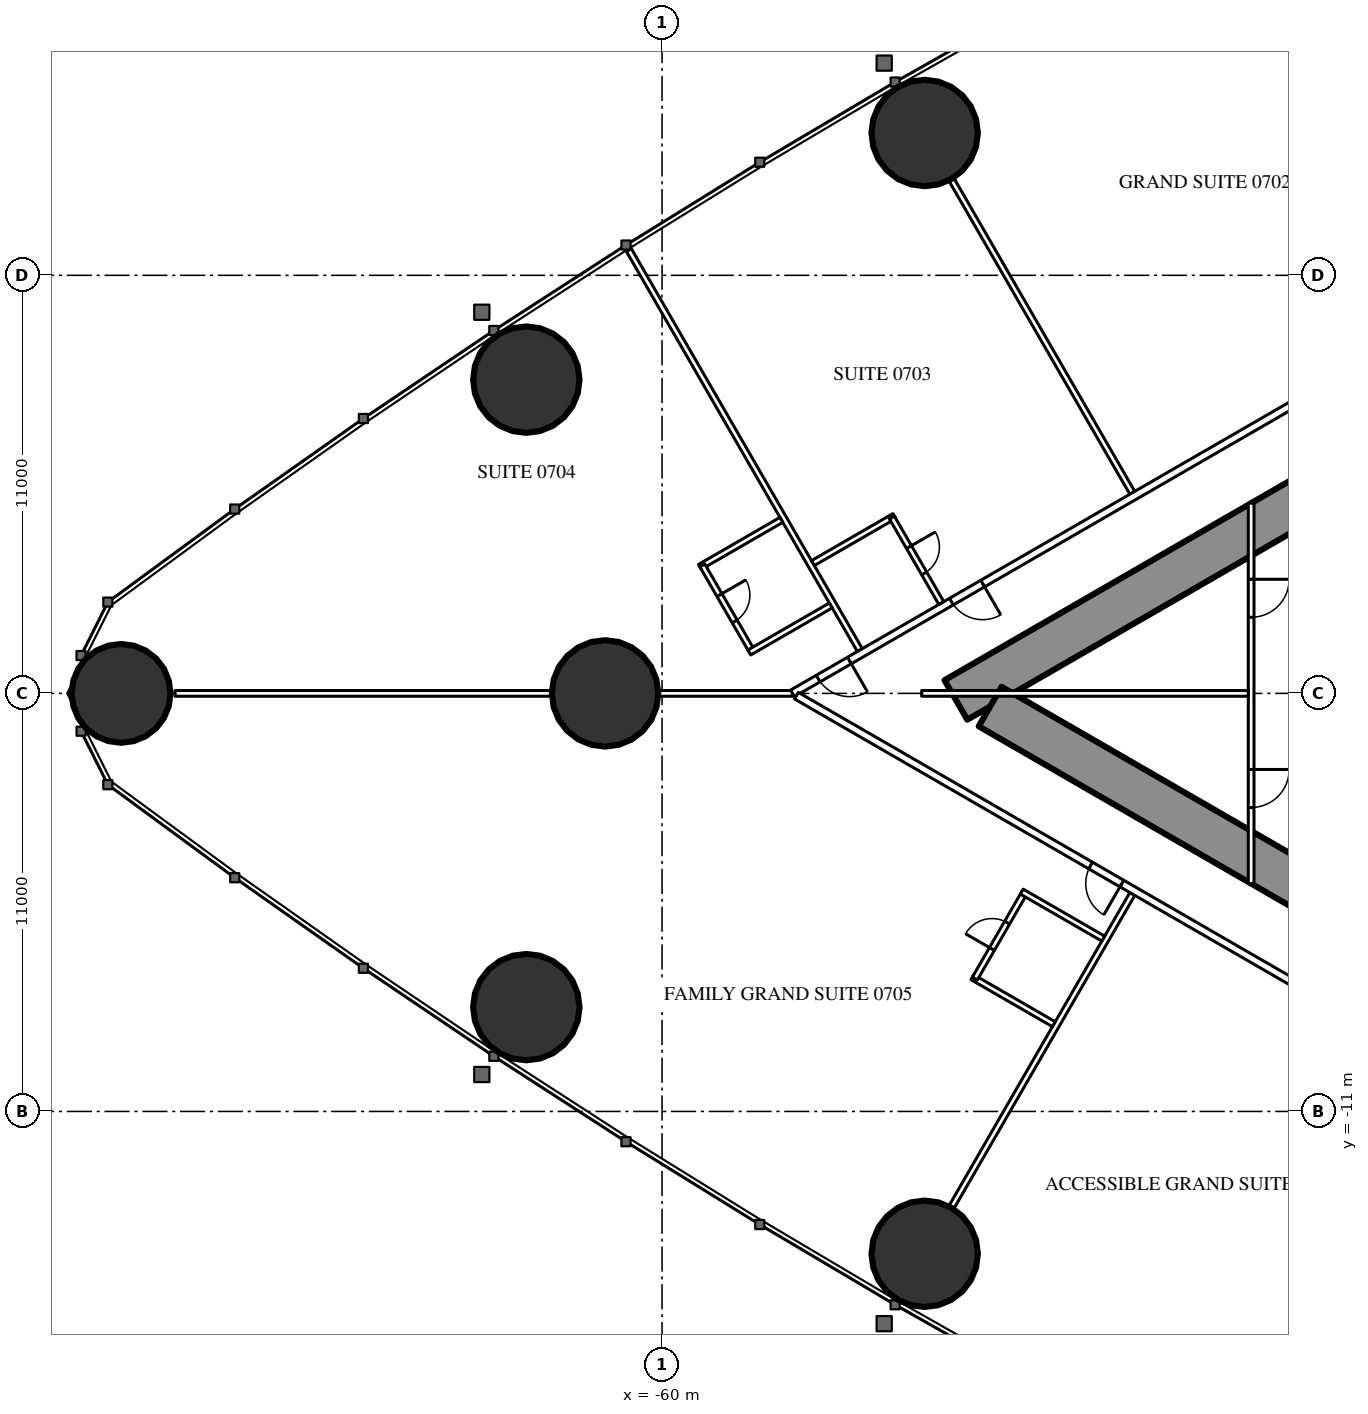
"""IFC4 building model, lengths in metres.
Left out: names, types, materials, properties, quantities, classifications, styles, units other than length and angle.
Written with IfcOpenShell. Run it as: python <this file> out.ifc"""

import sys

from ifc_helpers import new_model, si_unit, direction, frame, frame_2d, origin, origin_2d, place, context, subcontext, project, spatial, rectangle, hollow_circle, extrude, element, fill, save


model = new_model("IFC4")
c1 = context("Model", 3, precision=1e-05, world=origin(), true_north=direction((0.0, 1.0)))
c2 = subcontext(c1, "Body", "Model", "MODEL_VIEW")
j1 = project(units=[si_unit("LENGTHUNIT", "METRE"), si_unit("PLANEANGLEUNIT", "RADIAN")], contexts=[c1])
p1 = place(None, origin())
s1 = spatial("IfcSite", under=j1, at=p1, CompositionType="ELEMENT")
p2 = place(p1, origin())
s2 = spatial("IfcBuilding", under=s1, at=p2, CompositionType="ELEMENT")
p3 = place(p2, frame((0.0, 0.0, 32.0)))
s3 = spatial("IfcBuildingStorey", under=s2, at=p3, CompositionType="ELEMENT", Elevation=32.0)
p4 = place(p3, frame((-74.235, 0.0, 0.0), z_axis=(0.0, 0.0, 1.0), x_axis=(1.0, 0.0, 0.0)))
e1 = element("IfcColumn", 1, at=p4, inside=s3, PredefinedType="COLUMN", context=c2, shape_type="SweptSolid", body=[
    extrude(hollow_circle(Radius=1.3, WallThickness=0.1, at=origin_2d()), origin(), (0.0, 0.0, 1.0), 3.5),
])
for number, where, z_axis, x_axis in (
    (2, (-63.572, -8.255, 0.0), (0.0, 0.0, 1.0), (1.0, 0.0, 0.0)),
    (3, (-53.09, -14.745, 0.0), (0.0, 0.0, 1.0), (1.0, 0.0, 0.0)),
    (4, (-53.09, 14.745, 0.0), (0.0, 0.0, 1.0), (1.0, 0.0, 0.0)),
    (5, (-63.572, 8.255, 0.0), (0.0, 0.0, 1.0), (1.0, 0.0, 0.0)),
):
    element("IfcColumn", number, at=place(p3, frame(where, z_axis=z_axis, x_axis=x_axis)), inside=s3, PredefinedType="COLUMN", context=c2, shape_type="SweptSolid", body=[
        extrude(hollow_circle(Radius=1.4, WallThickness=0.12, at=origin_2d()), origin(), (0.0, 0.0, 1.0), 3.5),
    ])
p5 = place(p3, frame((-61.5, 0.0, 0.0), z_axis=(0.0, 0.0, 1.0), x_axis=(1.0, 0.0, 0.0)))
e6 = element("IfcColumn", 6, at=p5, inside=s3, PredefinedType="COLUMN", context=c2, shape_type="SweptSolid", body=[
    extrude(hollow_circle(Radius=1.4, WallThickness=0.1, at=origin_2d()), origin(), (0.0, 0.0, 1.0), 3.5),
])
p6 = place(p3, frame((-27.2, 14.3, 0.0), z_axis=(0.0, 0.0, 1.0), x_axis=(-0.866026593062, -0.499997940104, 0.0)))
e7 = element("IfcWall", 7, at=p6, inside=s3, PredefinedType="SHEAR", context=c2, shape_type="SweptSolid", body=[
    extrude(rectangle(XDim=28.946, YDim=1.2, at=frame_2d((14.473, 0.0))), origin(), (0.0, 0.0, 1.0), 3.5),
])
p7 = place(p6, frame((4.6, 0.0, 0.0)))
e8 = element("IfcOpeningElement", 8, at=p7, cuts=e7, PredefinedType="OPENING", context=c2, shape_type="SweptSolid", body=[
    extrude(rectangle(XDim=1.0, YDim=2.2, at=frame_2d((0.5, 1.1))), frame((0.0, 0.61, 0.0), z_axis=(0.0, -1.0, 0.0), x_axis=(1.0, 0.0, 0.0)), (0.0, 0.0, 1.0), 1.22),
])
p8 = place(p6, frame((13.395, 0.0, 0.0)))
e9 = element("IfcOpeningElement", 9, at=p8, cuts=e7, PredefinedType="OPENING", context=c2, shape_type="SweptSolid", body=[
    extrude(rectangle(XDim=1.8, YDim=2.2, at=frame_2d((0.9, 1.1))), frame((0.0, 0.61, 0.0), z_axis=(0.0, -1.0, 0.0), x_axis=(1.0, 0.0, 0.0)), (0.0, 0.0, 1.0), 1.22),
])
p9 = place(p3, frame((-27.2, -14.3, 0.0), z_axis=(0.0, 0.0, 1.0), x_axis=(-0.866024021859, 0.500002393557, 0.0)))
e10 = element("IfcWall", 10, at=p9, inside=s3, PredefinedType="SHEAR", context=c2, shape_type="SweptSolid", body=[
    extrude(rectangle(XDim=27.907, YDim=1.2, at=frame_2d((13.954, 0.0))), origin(), (0.0, 0.0, 1.0), 3.5),
])
p10 = place(p9, frame((4.6, 0.0, 0.0)))
e11 = element("IfcOpeningElement", 11, at=p10, cuts=e10, PredefinedType="OPENING", context=c2, shape_type="SweptSolid", body=[
    extrude(rectangle(XDim=1.0, YDim=2.2, at=frame_2d((0.5, 1.1))), frame((0.0, 0.61, 0.0), z_axis=(0.0, -1.0, 0.0), x_axis=(1.0, 0.0, 0.0)), (0.0, 0.0, 1.0), 1.22),
])
p11 = place(p9, frame((13.395, 0.0, 0.0)))
e12 = element("IfcOpeningElement", 12, at=p11, cuts=e10, PredefinedType="OPENING", context=c2, shape_type="SweptSolid", body=[
    extrude(rectangle(XDim=1.8, YDim=2.2, at=frame_2d((0.9, 1.1))), frame((0.0, 0.61, 0.0), z_axis=(0.0, -1.0, 0.0), x_axis=(1.0, 0.0, 0.0)), (0.0, 0.0, 1.0), 1.22),
])
p12 = place(p3, frame((-47.627, 5.278, 0.0), z_axis=(0.0, 0.0, 1.0), x_axis=(-0.500009844318, 0.86601972009, 0.0)))
e13 = element("IfcWall", 13, at=p12, inside=s3, PredefinedType="PARTITIONING", context=c2, shape_type="SweptSolid", body=[
    extrude(rectangle(XDim=9.51, YDim=0.15, at=frame_2d((4.755, 0.0))), origin(), (0.0, 0.0, 1.0), 2.25),
])
p13 = place(p3, frame((-54.796, 1.139, 0.0), z_axis=(0.0, 0.0, 1.0), x_axis=(-0.499998860433, 0.866026061713, 0.0)))
e14 = element("IfcWall", 14, at=p13, inside=s3, PredefinedType="PARTITIONING", context=c2, shape_type="SweptSolid", body=[
    extrude(rectangle(XDim=12.157, YDim=0.15, at=frame_2d((6.078, 0.0))), origin(), (0.0, 0.0, 1.0), 3.25),
])
p14 = place(p3, frame((-47.627, -5.278, 0.0), z_axis=(0.0, 0.0, 1.0), x_axis=(-0.500009844318, -0.86601972009, 0.0)))
e15 = element("IfcWall", 15, at=p14, inside=s3, PredefinedType="PARTITIONING", context=c2, shape_type="SweptSolid", body=[
    extrude(rectangle(XDim=9.51, YDim=0.15, at=frame_2d((4.755, 0.0))), origin(), (0.0, 0.0, 1.0), 2.25),
])
p15 = place(p3, frame((-56.568, 0.0, 0.0), z_axis=(0.0, 0.0, 1.0), x_axis=(-1.0, 0.0, 0.0)))
e16 = element("IfcWall", 16, at=p15, inside=s3, PredefinedType="PARTITIONING", context=c2, shape_type="SweptSolid", body=[
    extrude(rectangle(XDim=16.247, YDim=0.15, at=frame_2d((8.124, 0.0))), origin(), (0.0, 0.0, 1.0), 2.25),
])
p16 = place(p3, frame((-37.7, 10.894, 0.0), z_axis=(0.0, 0.0, 1.0), x_axis=(-0.866027905338, -0.499995667157, 0.0)))
e17 = element("IfcWall", 17, at=p16, inside=s3, PredefinedType="PARTITIONING", context=c2, shape_type="SweptSolid", body=[
    extrude(rectangle(XDim=21.787, YDim=0.2, at=frame_2d((10.894, 0.0))), origin(), (0.0, 0.0, 1.0), 3.25),
])
p17 = place(p16, frame((16.008, 0.0, 0.0)))
e18 = element("IfcOpeningElement", 18, at=p17, cuts=e17, PredefinedType="OPENING", context=c2, shape_type="SweptSolid", body=[
    extrude(rectangle(XDim=0.95, YDim=2.2, at=frame_2d((0.475, 1.1))), frame((0.0, 0.11, 0.0), z_axis=(0.0, -1.0, 0.0), x_axis=(1.0, 0.0, 0.0)), (0.0, 0.0, 1.0), 0.22),
])
p18 = place(p16, frame((20.058, 0.0, 0.0)))
e19 = element("IfcOpeningElement", 19, at=p18, cuts=e17, PredefinedType="OPENING", context=c2, shape_type="SweptSolid", body=[
    extrude(rectangle(XDim=0.95, YDim=2.2, at=frame_2d((0.475, 1.1))), frame((0.0, 0.11, 0.0), z_axis=(0.0, -1.0, 0.0), x_axis=(1.0, 0.0, 0.0)), (0.0, 0.0, 1.0), 0.22),
])
p19 = place(p16, frame((2.95, 0.0, 0.0)))
e20 = element("IfcOpeningElement", 20, at=p19, cuts=e17, PredefinedType="OPENING", context=c2, shape_type="SweptSolid", body=[
    extrude(rectangle(XDim=0.95, YDim=2.2, at=frame_2d((0.475, 1.1))), frame((0.0, 0.11, 0.0), z_axis=(0.0, -1.0, 0.0), x_axis=(1.0, 0.0, 0.0)), (0.0, 0.0, 1.0), 0.22),
])
p20 = place(p3, frame((-36.92, -11.344, 0.0), z_axis=(0.0, 0.0, 1.0), x_axis=(-0.866028313256, 0.499994960614, 0.0)))
e21 = element("IfcWall", 21, at=p20, inside=s3, PredefinedType="PARTITIONING", context=c2, shape_type="SweptSolid", body=[
    extrude(rectangle(XDim=22.568, YDim=0.2, at=frame_2d((11.284, 0.0))), origin(), (0.0, 0.0, 1.0), 3.25),
])
p21 = place(p20, frame((12.68, 0.0, 0.0)))
e22 = element("IfcOpeningElement", 22, at=p21, cuts=e21, PredefinedType="OPENING", context=c2, shape_type="SweptSolid", body=[
    extrude(rectangle(XDim=0.95, YDim=2.2, at=frame_2d((0.475, 1.1))), frame((0.0, 0.11, 0.0), z_axis=(0.0, -1.0, 0.0), x_axis=(1.0, 0.0, 0.0)), (0.0, 0.0, 1.0), 0.22),
])
p22 = place(p20, frame((3.35, 0.0, 0.0)))
e23 = element("IfcOpeningElement", 23, at=p22, cuts=e21, PredefinedType="OPENING", context=c2, shape_type="SweptSolid", body=[
    extrude(rectangle(XDim=1.0, YDim=2.2, at=frame_2d((0.5, 1.1))), frame((0.0, 0.11, 0.0), z_axis=(0.0, -1.0, 0.0), x_axis=(1.0, 0.0, 0.0)), (0.0, 0.0, 1.0), 0.22),
])
p23 = place(p3, frame((-53.888, 4.665, 0.0), z_axis=(0.0, 0.0, 1.0), x_axis=(-0.866006523861, -0.500032699561, 0.0)))
e24 = element("IfcWall", 24, at=p23, inside=s3, PredefinedType="PARTITIONING", context=c2, shape_type="SweptSolid", body=[
    extrude(rectangle(XDim=2.475, YDim=0.15, at=frame_2d((1.237, 0.0))), origin(), (0.0, 0.0, 1.0), 3.25),
])
p24 = place(p3, frame((-52.653, 2.376, 0.0), z_axis=(0.0, 0.0, 1.0), x_axis=(-0.500006934395, 0.866021400173, 0.0)))
e25 = element("IfcWall", 25, at=p24, inside=s3, PredefinedType="PARTITIONING", context=c2, shape_type="SweptSolid", body=[
    extrude(rectangle(XDim=2.6, YDim=0.15, at=frame_2d((1.3, 0.0))), origin(), (0.0, 0.0, 1.0), 3.25),
])
p25 = place(p24, frame((0.9, 0.0, 0.0)))
e26 = element("IfcOpeningElement", 26, at=p25, cuts=e25, PredefinedType="OPENING", context=c2, shape_type="SweptSolid", body=[
    extrude(rectangle(XDim=0.8, YDim=2.2, at=frame_2d((0.4, 1.1))), frame((0.0, 0.085, 0.0), z_axis=(0.0, -1.0, 0.0), x_axis=(1.0, 0.0, 0.0)), (0.0, 0.0, 1.0), 0.17),
])
p26 = place(p3, frame((-56.861, 4.565, 0.0), z_axis=(0.0, 0.0, 1.0), x_axis=(-0.86604923931, -0.499958713387, 0.0)))
e27 = element("IfcWall", 27, at=p26, inside=s3, PredefinedType="PARTITIONING", context=c2, shape_type="SweptSolid", body=[
    extrude(rectangle(XDim=2.475, YDim=0.15, at=frame_2d((1.237, 0.0))), origin(), (0.0, 0.0, 1.0), 3.25),
])
p27 = place(p3, frame((-57.639, 1.114, 0.0), z_axis=(0.0, 0.0, 1.0), x_axis=(-0.500006934395, 0.866021400173, 0.0)))
e28 = element("IfcWall", 28, at=p27, inside=s3, PredefinedType="PARTITIONING", context=c2, shape_type="SweptSolid", body=[
    extrude(rectangle(XDim=2.6, YDim=0.15, at=frame_2d((1.3, 0.0))), origin(), (0.0, 0.0, 1.0), 3.25),
])
p28 = place(p27, frame((0.9, 0.0, 0.0)))
e29 = element("IfcOpeningElement", 29, at=p28, cuts=e28, PredefinedType="OPENING", context=c2, shape_type="SweptSolid", body=[
    extrude(rectangle(XDim=0.8, YDim=2.2, at=frame_2d((0.4, 1.1))), frame((0.0, 0.085, 0.0), z_axis=(0.0, -1.0, 0.0), x_axis=(1.0, 0.0, 0.0)), (0.0, 0.0, 1.0), 0.17),
])
p29 = place(p3, frame((-55.561, 2.313, 0.0), z_axis=(0.0, 0.0, 1.0), x_axis=(-0.86604923931, -0.499958713387, 0.0)))
e30 = element("IfcWall", 30, at=p29, inside=s3, PredefinedType="PARTITIONING", context=c2, shape_type="SweptSolid", body=[
    extrude(rectangle(XDim=2.475, YDim=0.15, at=frame_2d((1.237, 0.0))), origin(), (0.0, 0.0, 1.0), 3.25),
])
p30 = place(p3, frame((-49.692, -8.704, 0.0), z_axis=(0.0, 0.0, 1.0), x_axis=(-0.866073894602, 0.499916002032, 0.0)))
e31 = element("IfcWall", 31, at=p30, inside=s3, PredefinedType="PARTITIONING", context=c2, shape_type="SweptSolid", body=[
    extrude(rectangle(XDim=2.475, YDim=0.15, at=frame_2d((1.238, 0.0))), origin(), (0.0, 0.0, 1.0), 3.25),
])
p31 = place(p3, frame((-50.47, -5.253, 0.0), z_axis=(0.0, 0.0, 1.0), x_axis=(-0.500006934395, -0.866021400173, 0.0)))
e32 = element("IfcWall", 32, at=p31, inside=s3, PredefinedType="PARTITIONING", context=c2, shape_type="SweptSolid", body=[
    extrude(rectangle(XDim=2.6, YDim=0.15, at=frame_2d((1.3, 0.0))), origin(), (0.0, 0.0, 1.0), 3.25),
])
p32 = place(p31, frame((0.9, 0.0, 0.0)))
e33 = element("IfcOpeningElement", 33, at=p32, cuts=e32, PredefinedType="OPENING", context=c2, shape_type="SweptSolid", body=[
    extrude(rectangle(XDim=0.8, YDim=2.2, at=frame_2d((0.4, 1.1))), frame((0.0, 0.085, 0.0), z_axis=(0.0, -1.0, 0.0), x_axis=(1.0, 0.0, 0.0)), (0.0, 0.0, 1.0), 0.17),
])
p33 = place(p3, frame((-48.392, -6.453, 0.0), z_axis=(0.0, 0.0, 1.0), x_axis=(-0.86604923931, 0.499958713387, 0.0)))
e34 = element("IfcWall", 34, at=p33, inside=s3, PredefinedType="PARTITIONING", context=c2, shape_type="SweptSolid", body=[
    extrude(rectangle(XDim=2.475, YDim=0.15, at=frame_2d((1.237, 0.0))), origin(), (0.0, 0.0, 1.0), 3.25),
])
p34 = place(p3, frame((-44.5, 5.005, 0.0), z_axis=(0.0, 0.0, 1.0), x_axis=(0.0, -1.0, 0.0)))
e35 = element("IfcWall", 35, at=p34, inside=s3, PredefinedType="PARTITIONING", context=c2, shape_type="SweptSolid", body=[
    extrude(rectangle(XDim=10.009, YDim=0.15, at=frame_2d((5.005, 0.0))), origin(), (0.0, 0.0, 1.0), 2.45),
])
p35 = place(p34, frame((2.002, 0.0, 0.0)))
e36 = element("IfcOpeningElement", 36, at=p35, cuts=e35, PredefinedType="OPENING", context=c2, shape_type="SweptSolid", body=[
    extrude(rectangle(XDim=1.0, YDim=2.2, at=frame_2d((0.5, 1.1))), frame((0.0, 0.085, 0.0), z_axis=(0.0, -1.0, 0.0), x_axis=(1.0, 0.0, 0.0)), (0.0, 0.0, 1.0), 0.17),
])
p36 = place(p34, frame((7.007, 0.0, 0.0)))
e37 = element("IfcOpeningElement", 37, at=p36, cuts=e35, PredefinedType="OPENING", context=c2, shape_type="SweptSolid", body=[
    extrude(rectangle(XDim=1.0, YDim=2.2, at=frame_2d((0.5, 1.1))), frame((0.0, 0.085, 0.0), z_axis=(0.0, -1.0, 0.0), x_axis=(1.0, 0.0, 0.0)), (0.0, 0.0, 1.0), 0.17),
])
p37 = place(p3, frame((-44.575, 0.0, 0.0), z_axis=(0.0, 0.0, 1.0), x_axis=(-1.0, 0.0, 0.0)))
e38 = element("IfcWall", 38, at=p37, inside=s3, PredefinedType="PARTITIONING", context=c2, shape_type="SweptSolid", body=[
    extrude(rectangle(XDim=8.593, YDim=0.15, at=frame_2d((4.297, 0.0))), origin(), (0.0, 0.0, 1.0), 2.25),
])
p38 = place(p25, origin())
e39 = element("IfcDoor", 39, at=p38, inside=s3, OperationType="SINGLE_SWING_RIGHT", PredefinedType="DOOR", context=c2, shape_type="SweptSolid", body=[
    extrude(rectangle(XDim=0.8, YDim=2.2, at=frame_2d((0.4, 1.1))), frame((0.0, 0.025, 0.0), z_axis=(0.0, -1.0, 0.0), x_axis=(1.0, 0.0, 0.0)), (0.0, 0.0, 1.0), 0.05),
])
fill(e26, e39)
p39 = place(p17, origin())
e40 = element("IfcDoor", 40, at=p39, inside=s3, OperationType="SINGLE_SWING_LEFT", PredefinedType="DOOR", context=c2, shape_type="SweptSolid", body=[
    extrude(rectangle(XDim=0.95, YDim=2.2, at=frame_2d((0.475, 1.1))), frame((0.0, 0.025, 0.0), z_axis=(0.0, -1.0, 0.0), x_axis=(1.0, 0.0, 0.0)), (0.0, 0.0, 1.0), 0.05),
])
fill(e18, e40)
p40 = place(p28, origin())
e41 = element("IfcDoor", 41, at=p40, inside=s3, OperationType="SINGLE_SWING_RIGHT", PredefinedType="DOOR", context=c2, shape_type="SweptSolid", body=[
    extrude(rectangle(XDim=0.8, YDim=2.2, at=frame_2d((0.4, 1.1))), frame((0.0, 0.025, 0.0), z_axis=(0.0, -1.0, 0.0), x_axis=(1.0, 0.0, 0.0)), (0.0, 0.0, 1.0), 0.05),
])
fill(e29, e41)
p41 = place(p18, origin())
e42 = element("IfcDoor", 42, at=p41, inside=s3, OperationType="SINGLE_SWING_LEFT", PredefinedType="DOOR", context=c2, shape_type="SweptSolid", body=[
    extrude(rectangle(XDim=0.95, YDim=2.2, at=frame_2d((0.475, 1.1))), frame((0.0, 0.025, 0.0), z_axis=(0.0, -1.0, 0.0), x_axis=(1.0, 0.0, 0.0)), (0.0, 0.0, 1.0), 0.05),
])
fill(e19, e42)
p42 = place(p32, origin())
e43 = element("IfcDoor", 43, at=p42, inside=s3, OperationType="SINGLE_SWING_RIGHT", PredefinedType="DOOR", context=c2, shape_type="SweptSolid", body=[
    extrude(rectangle(XDim=0.8, YDim=2.2, at=frame_2d((0.4, 1.1))), frame((0.0, 0.025, 0.0), z_axis=(0.0, -1.0, 0.0), x_axis=(1.0, 0.0, 0.0)), (0.0, 0.0, 1.0), 0.05),
])
fill(e33, e43)
p43 = place(p21, origin())
e44 = element("IfcDoor", 44, at=p43, inside=s3, OperationType="SINGLE_SWING_LEFT", PredefinedType="DOOR", context=c2, shape_type="SweptSolid", body=[
    extrude(rectangle(XDim=0.95, YDim=2.2, at=frame_2d((0.475, 1.1))), frame((0.0, 0.025, 0.0), z_axis=(0.0, -1.0, 0.0), x_axis=(1.0, 0.0, 0.0)), (0.0, 0.0, 1.0), 0.05),
])
fill(e22, e44)
p44 = place(p35, origin())
e45 = element("IfcDoor", 45, at=p44, inside=s3, OperationType="SINGLE_SWING_LEFT", PredefinedType="DOOR", context=c2, shape_type="SweptSolid", body=[
    extrude(rectangle(XDim=1.0, YDim=2.2, at=frame_2d((0.5, 1.1))), frame((0.0, 0.025, 0.0), z_axis=(0.0, -1.0, 0.0), x_axis=(1.0, 0.0, 0.0)), (0.0, 0.0, 1.0), 0.05),
])
fill(e36, e45)
p45 = place(p36, origin())
e46 = element("IfcDoor", 46, at=p45, inside=s3, OperationType="SINGLE_SWING_LEFT", PredefinedType="DOOR", context=c2, shape_type="SweptSolid", body=[
    extrude(rectangle(XDim=1.0, YDim=2.2, at=frame_2d((0.5, 1.1))), frame((0.0, 0.025, 0.0), z_axis=(0.0, -1.0, 0.0), x_axis=(1.0, 0.0, 0.0)), (0.0, 0.0, 1.0), 0.05),
])
fill(e37, e46)
save(model, sys.argv[1])
